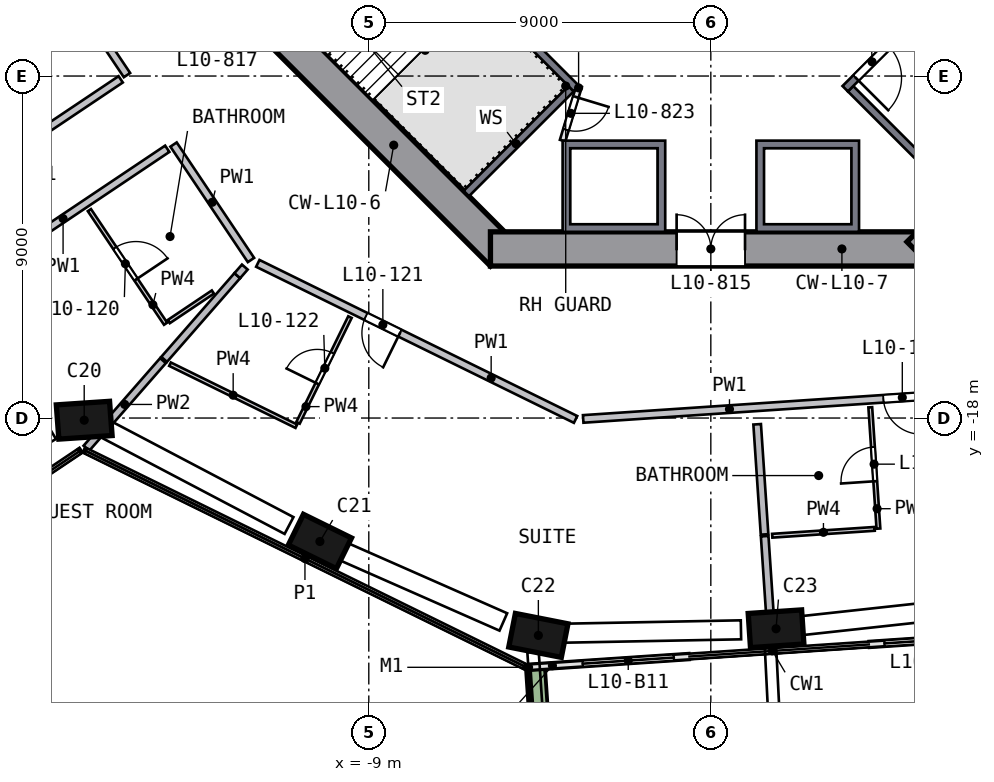
"""IFC4 building model, lengths in metres.
Left out: names, types, materials, properties, quantities, classifications, styles, units other than length and angle.
Written with IfcOpenShell. Run it as: python <this file> out.ifc"""

import sys

from ifc_helpers import new_model, si_unit, direction, frame, frame_2d, origin, origin_2d, place, context, subcontext, project, spatial, polyline, rectangle, outline, extrude, element, fill, save


model = new_model("IFC4")
c1 = context("Model", 3, precision=1e-05, world=origin(), true_north=direction((0.0, 1.0)))
c2 = subcontext(c1, "Body", "Model", "MODEL_VIEW")
j1 = project(units=[si_unit("LENGTHUNIT", "METRE"), si_unit("PLANEANGLEUNIT", "RADIAN")], contexts=[c1])
p1 = place(None, origin())
s1 = spatial("IfcSite", under=j1, at=p1, CompositionType="ELEMENT")
p2 = place(p1, origin())
s2 = spatial("IfcBuilding", under=s1, at=p2, CompositionType="ELEMENT")
p3 = place(p2, frame((0.0, 0.0, 49.5)))
s3 = spatial("IfcBuildingStorey", under=s2, at=p3, CompositionType="ELEMENT", Elevation=49.5)
p4 = place(p3, frame((-16.593, -17.963, 0.0), z_axis=(0.086049291, -0.078219718, 0.993215583), x_axis=(-0.994079328, -0.073128396, 0.080364969)))
e1 = element("IfcColumn", 1, at=p4, inside=s3, PredefinedType="COLUMN", context=c2, shape_type="SweptSolid", body=[
    extrude(rectangle(XDim=1.4, YDim=0.9, at=origin_2d()), origin(), (0.0, 0.0, 1.0), 3.212),
])
p5 = place(p3, frame((-10.408, -21.19, 0.0), z_axis=(0.101222872, -0.048672155, 0.993672457), x_axis=(0.891838808, -0.438188759, -0.11231274)))
e2 = element("IfcColumn", 2, at=p5, inside=s3, PredefinedType="COLUMN", context=c2, shape_type="SweptSolid", body=[
    extrude(rectangle(XDim=1.4, YDim=0.9, at=origin_2d()), origin(), (0.0, 0.0, 1.0), 3.21),
])
p6 = place(p3, frame((-4.675, -23.695, 0.0), z_axis=(0.11290116, -0.021287761, 0.993378155), x_axis=(-0.974579908, 0.192341107, 0.114886474)))
e3 = element("IfcColumn", 3, at=p6, inside=s3, PredefinedType="COLUMN", context=c2, shape_type="SweptSolid", body=[
    extrude(rectangle(XDim=1.4, YDim=0.9, at=origin_2d()), origin(), (0.0, 0.0, 1.0), 3.211),
])
p7 = place(p3, frame((1.581, -23.555, 0.0), z_axis=(0.112021718, 0.008441555, 0.993669902), x_axis=(0.991458896, 0.066257297, -0.112335337)))
e4 = element("IfcColumn", 4, at=p7, inside=s3, PredefinedType="COLUMN", context=c2, shape_type="SweptSolid", body=[
    extrude(rectangle(XDim=1.4, YDim=0.9, at=origin_2d()), origin(), (0.0, 0.0, 1.0), 3.21),
])
p8 = place(p3, frame((-13.682, -5.481, 0.0), z_axis=(0.0, 0.0, 1.0), x_axis=(0.707106781, -0.707106781, 0.0)))
e5 = element("IfcWall", 5, at=p8, inside=s3, PredefinedType="SHEAR", context=c2, shape_type="SweptSolid", body=[
    extrude(rectangle(XDim=11.598, YDim=0.9, at=frame_2d((5.799, 0.0))), origin(), (0.0, 0.0, 1.0), 3.5),
])
p9 = place(p8, frame((2.099, 0.0, 0.0)))
e6 = element("IfcOpeningElement", 6, at=p9, cuts=e5, PredefinedType="OPENING", context=c2, shape_type="SweptSolid", body=[
    extrude(rectangle(XDim=1.2, YDim=2.1, at=frame_2d((0.6, 1.05))), frame((0.0, 0.46, 0.0), z_axis=(0.0, -1.0, 0.0), x_axis=(1.0, 0.0, 0.0)), (0.0, 0.0, 1.0), 0.92),
])
p10 = place(p3, frame((-5.799, -13.55, 0.0), z_axis=(0.0, 0.0, 1.0), x_axis=(1.0, 0.0, 0.0)))
e7 = element("IfcWall", 7, at=p10, inside=s3, PredefinedType="SHEAR", context=c2, shape_type="SweptSolid", body=[
    extrude(rectangle(XDim=11.598, YDim=0.9, at=frame_2d((5.799, 0.0))), origin(), (0.0, 0.0, 1.0), 3.5),
])
p11 = place(p10, frame((4.899, 0.0, 0.0)))
e8 = element("IfcOpeningElement", 8, at=p11, cuts=e7, PredefinedType="OPENING", context=c2, shape_type="SweptSolid", body=[
    extrude(rectangle(XDim=1.8, YDim=2.1, at=frame_2d((0.9, 1.05))), frame((0.0, 0.46, 0.0), z_axis=(0.0, -1.0, 0.0), x_axis=(1.0, 0.0, 0.0)), (0.0, 0.0, 1.0), 0.92),
])
p12 = place(p3, frame((5.481, -13.682, 0.0), z_axis=(0.0, 0.0, 1.0), x_axis=(0.707106781, 0.707106781, 0.0)))
e9 = element("IfcWall", 9, at=p12, inside=s3, PredefinedType="SHEAR", context=c2, shape_type="SweptSolid", body=[
    extrude(rectangle(XDim=11.598, YDim=0.9, at=frame_2d((5.799, 0.0))), origin(), (0.0, 0.0, 1.0), 3.5),
])
p13 = place(p12, frame((2.099, 0.0, 0.0)))
e10 = element("IfcOpeningElement", 10, at=p13, cuts=e9, PredefinedType="OPENING", context=c2, shape_type="SweptSolid", body=[
    extrude(rectangle(XDim=1.2, YDim=2.1, at=frame_2d((0.6, 1.05))), frame((0.0, 0.46, 0.0), z_axis=(0.0, -1.0, 0.0), x_axis=(1.0, 0.0, 0.0)), (0.0, 0.0, 1.0), 0.92),
])
p14 = place(p3, frame((-4.766, -24.558, 0.0), z_axis=(0.0, 0.0, 1.0), x_axis=(0.997753916, 0.066985985, 0.0)))
e11 = element("IfcWall", 11, at=p14, inside=s3, PredefinedType="SOLIDWALL", context=c2, shape_type="SweptSolid", body=[
    extrude(rectangle(XDim=4.199, YDim=0.15, at=frame_2d((2.099, 0.0))), origin(), (0.0, 0.0, 1.0), 2.425),
])
p15 = place(p14, frame((1.399, 0.0, 0.0)))
e12 = element("IfcOpeningElement", 12, at=p15, cuts=e11, PredefinedType="OPENING", context=c2, shape_type="SweptSolid", body=[
    extrude(rectangle(XDim=2.4, YDim=2.4, at=frame_2d((1.2, 1.2))), frame((0.0, 0.085, 0.0), z_axis=(0.0, -1.0, 0.0), x_axis=(1.0, 0.0, 0.0)), (0.0, 0.0, 1.0), 0.17),
])
p16 = place(p3, frame((4.172, -23.958, 0.0), z_axis=(0.0, 0.0, 1.0), x_axis=(0.997754118, 0.066982983, 0.0)))
e13 = element("IfcWall", 13, at=p16, inside=s3, PredefinedType="SOLIDWALL", context=c2, shape_type="SweptSolid", body=[
    extrude(rectangle(XDim=3.842, YDim=0.15, at=frame_2d((1.921, 0.0))), origin(), (0.0, 0.0, 1.0), 2.425),
])
p17 = place(p16, frame((0.4, 0.0, 0.0)))
e14 = element("IfcOpeningElement", 14, at=p17, cuts=e13, PredefinedType="OPENING", context=c2, shape_type="SweptSolid", body=[
    extrude(rectangle(XDim=2.4, YDim=2.4, at=frame_2d((1.2, 1.2))), frame((0.0, 0.085, 0.0), z_axis=(0.0, -1.0, 0.0), x_axis=(1.0, 0.0, 0.0)), (0.0, 0.0, 1.0), 0.17),
])
p18 = place(p3, frame((-4.611, -24.624, 0.0), z_axis=(0.0, 0.0, 1.0), x_axis=(0.067010365, -0.997752279, 0.0)))
e15 = element("IfcWall", 15, at=p18, inside=s3, PredefinedType="SOLIDWALL", context=c2, shape_type="SweptSolid", body=[
    extrude(rectangle(XDim=3.199, YDim=0.5, at=frame_2d((1.599, 0.0))), origin(), (0.0, 0.0, 1.0), 0.7),
])
p19 = place(p3, origin())
e16 = element("IfcWall", 16, at=p19, inside=s3, PredefinedType="SOLIDWALL", context=c2, shape_type="SweptSolid", body=[
    extrude(outline(polyline([(-1.2, -13.1), (-3.9, -13.1), (-3.9, -10.7), (-1.2, -10.7), (-1.2, -13.1)]), holes=[polyline([(-3.7, -10.9), (-3.7, -12.9), (-1.4, -12.9), (-1.4, -10.9), (-3.7, -10.9)])]), origin(), (0.0, 0.0, 1.0), 3.19),
])
p20 = place(p3, origin())
e17 = element("IfcWall", 17, at=p20, inside=s3, PredefinedType="SOLIDWALL", context=c2, shape_type="SweptSolid", body=[
    extrude(outline(polyline([(3.9, -10.7), (3.9, -13.1), (1.2, -13.1), (1.2, -10.7), (3.9, -10.7)]), holes=[polyline([(1.4, -12.9), (3.7, -12.9), (3.7, -10.9), (1.4, -10.9), (1.4, -12.9)])]), origin(), (0.0, 0.0, 1.0), 3.19),
])
p21 = place(p3, frame((-3.535, -9.334, 0.0), z_axis=(0.0, 0.0, 1.0), x_axis=(-0.707106781, 0.707106781, 0.0)))
e18 = element("IfcWall", 18, at=p21, inside=s3, PredefinedType="SOLIDWALL", context=c2, shape_type="SweptSolid", body=[
    extrude(rectangle(XDim=8.2, YDim=0.2, at=frame_2d((4.1, 0.0))), origin(), (0.0, 0.0, 1.0), 3.19),
])
p22 = place(p21, frame((6.6, 0.0, 0.0)))
e19 = element("IfcOpeningElement", 19, at=p22, cuts=e18, PredefinedType="OPENING", context=c2, shape_type="SweptSolid", body=[
    extrude(rectangle(XDim=1.2, YDim=2.1, at=frame_2d((0.6, 1.05))), frame((0.0, 0.11, 0.0), z_axis=(0.0, -1.0, 0.0), x_axis=(1.0, 0.0, 0.0)), (0.0, 0.0, 1.0), 0.22),
])
p23 = place(p3, frame((-3.677, -9.334, 0.0), z_axis=(0.0, 0.0, 1.0), x_axis=(-0.707106781, -0.707106781, 0.0)))
e20 = element("IfcWall", 20, at=p23, inside=s3, PredefinedType="SOLIDWALL", context=c2, shape_type="SweptSolid", body=[
    extrude(rectangle(XDim=3.9, YDim=0.2, at=frame_2d((1.95, 0.0))), origin(), (0.0, 0.0, 1.0), 3.19),
])
p24 = place(p3, frame((9.334, -3.535, 0.0), z_axis=(0.0, 0.0, 1.0), x_axis=(-0.707106781, -0.707106781, 0.0)))
e21 = element("IfcWall", 21, at=p24, inside=s3, PredefinedType="SOLIDWALL", context=c2, shape_type="SweptSolid", body=[
    extrude(rectangle(XDim=8.2, YDim=0.2, at=frame_2d((4.1, 0.0))), origin(), (0.0, 0.0, 1.0), 3.19),
])
p25 = place(p24, frame((6.6, 0.0, 0.0)))
e22 = element("IfcOpeningElement", 22, at=p25, cuts=e21, PredefinedType="OPENING", context=c2, shape_type="SweptSolid", body=[
    extrude(rectangle(XDim=1.2, YDim=2.1, at=frame_2d((0.6, 1.05))), frame((0.0, 0.11, 0.0), z_axis=(0.0, -1.0, 0.0), x_axis=(1.0, 0.0, 0.0)), (0.0, 0.0, 1.0), 0.22),
])
p26 = place(p3, frame((3.677, -9.334, 0.0), z_axis=(0.0, 0.0, 1.0), x_axis=(0.707106781, -0.707106781, 0.0)))
e23 = element("IfcWall", 23, at=p26, inside=s3, PredefinedType="SOLIDWALL", context=c2, shape_type="SweptSolid", body=[
    extrude(rectangle(XDim=3.9, YDim=0.2, at=frame_2d((1.95, 0.0))), origin(), (0.0, 0.0, 1.0), 3.19),
])
p27 = place(p3, frame((-3.465, -9.263, 0.0), z_axis=(0.0, 0.0, 1.0), x_axis=(-0.289808785, -0.957084567, 0.0)))
e24 = element("IfcWall", 24, at=p27, inside=s3, PredefinedType="PARTITIONING", context=c2, shape_type="SweptSolid", body=[
    extrude(rectangle(XDim=1.501, YDim=0.15, at=frame_2d((0.75, 0.0))), origin(), (0.0, 0.0, 1.0), 3.19),
])
p28 = place(p27, frame((0.301, 0.0, 0.0)))
e25 = element("IfcOpeningElement", 25, at=p28, cuts=e24, PredefinedType="OPENING", context=c2, shape_type="SweptSolid", body=[
    extrude(rectangle(XDim=0.9, YDim=2.1, at=frame_2d((0.45, 1.05))), frame((0.0, 0.085, 0.0), z_axis=(0.0, -1.0, 0.0), x_axis=(1.0, 0.0, 0.0)), (0.0, 0.0, 1.0), 0.17),
])
p29 = place(p3, frame((-27.298, -16.978, 0.0), z_axis=(0.0, 0.0, 1.0), x_axis=(0.83059481, 0.556877241, 0.0)))
e26 = element("IfcWall", 26, at=p29, inside=s3, PredefinedType="SOLIDWALL", context=c2, shape_type="SweptSolid", body=[
    extrude(rectangle(XDim=14.169, YDim=0.2, at=frame_2d((7.085, 0.0))), origin(), (0.0, 0.0, 1.0), 3.19),
])
p30 = place(p29, frame((6.3, 0.0, 0.0)))
e27 = element("IfcOpeningElement", 27, at=p30, cuts=e26, PredefinedType="OPENING", context=c2, shape_type="SweptSolid", body=[
    extrude(rectangle(XDim=1.0, YDim=2.1, at=frame_2d((0.5, 1.05))), frame((0.0, 0.11, 0.0), z_axis=(0.0, -1.0, 0.0), x_axis=(1.0, 0.0, 0.0)), (0.0, 0.0, 1.0), 0.22),
])
p31 = place(p3, frame((-14.304, -10.914, 0.0), z_axis=(0.0, 0.0, 1.0), x_axis=(-0.83059481, -0.556877241, 0.0)))
e28 = element("IfcWall", 28, at=p31, inside=s3, PredefinedType="SOLIDWALL", context=c2, shape_type="SweptSolid", body=[
    extrude(rectangle(XDim=14.169, YDim=0.2, at=frame_2d((7.085, 0.0))), origin(), (0.0, 0.0, 1.0), 3.19),
])
p32 = place(p31, frame((12.475, 0.0, 0.0)))
e29 = element("IfcOpeningElement", 29, at=p32, cuts=e28, PredefinedType="OPENING", context=c2, shape_type="SweptSolid", body=[
    extrude(rectangle(XDim=0.9, YDim=2.1, at=frame_2d((0.45, 1.05))), frame((0.0, 0.11, 0.0), z_axis=(0.0, -1.0, 0.0), x_axis=(1.0, 0.0, 0.0)), (0.0, 0.0, 1.0), 0.22),
])
p33 = place(p31, frame((6.8, 0.0, 0.0)))
e30 = element("IfcOpeningElement", 30, at=p33, cuts=e28, PredefinedType="OPENING", context=c2, shape_type="SweptSolid", body=[
    extrude(rectangle(XDim=1.0, YDim=2.1, at=frame_2d((0.5, 1.05))), frame((0.0, 0.11, 0.0), z_axis=(0.0, -1.0, 0.0), x_axis=(1.0, 0.0, 0.0)), (0.0, 0.0, 1.0), 0.22),
])
p34 = place(p3, frame((-17.256, -6.152, 0.0), z_axis=(0.0, 0.0, 1.0), x_axis=(0.556869112, -0.83060026, 0.0)))
e31 = element("IfcWall", 31, at=p34, inside=s3, PredefinedType="SOLIDWALL", context=c2, shape_type="SweptSolid", body=[
    extrude(rectangle(XDim=3.4, YDim=0.2, at=frame_2d((1.7, 0.0))), origin(), (0.0, 0.0, 1.0), 3.19),
])
p35 = place(p3, frame((-14.137, -10.803, 0.0), z_axis=(0.0, 0.0, 1.0), x_axis=(0.556900496, -0.830579218, 0.0)))
e32 = element("IfcWall", 32, at=p35, inside=s3, PredefinedType="SOLIDWALL", context=c2, shape_type="SweptSolid", body=[
    extrude(rectangle(XDim=3.658, YDim=0.2, at=frame_2d((1.829, 0.0))), origin(), (0.0, 0.0, 1.0), 3.19),
])
p36 = place(p3, frame((-3.559, -18.037, 0.0), z_axis=(0.0, 0.0, 1.0), x_axis=(-0.897570519, 0.440870915, 0.0)))
e33 = element("IfcWall", 33, at=p36, inside=s3, PredefinedType="SOLIDWALL", context=c2, shape_type="SweptSolid", body=[
    extrude(rectangle(XDim=9.316, YDim=0.2, at=frame_2d((4.658, 0.0))), origin(), (0.0, 0.0, 1.0), 3.19),
])
p37 = place(p36, frame((5.15, 0.0, 0.0)))
e34 = element("IfcOpeningElement", 34, at=p37, cuts=e33, PredefinedType="OPENING", context=c2, shape_type="SweptSolid", body=[
    extrude(rectangle(XDim=1.0, YDim=2.1, at=frame_2d((0.5, 1.05))), frame((0.0, 0.11, 0.0), z_axis=(0.0, -1.0, 0.0), x_axis=(1.0, 0.0, 0.0)), (0.0, 0.0, 1.0), 0.22),
])
p38 = place(p3, frame((5.737, -17.413, 0.0), z_axis=(0.0, 0.0, 1.0), x_axis=(-0.99775412, -0.066982956, 0.0)))
e35 = element("IfcWall", 35, at=p38, inside=s3, PredefinedType="SOLIDWALL", context=c2, shape_type="SweptSolid", body=[
    extrude(rectangle(XDim=9.116, YDim=0.2, at=frame_2d((4.558, 0.0))), origin(), (0.0, 0.0, 1.0), 3.19),
])
p39 = place(p38, frame((0.2, 0.0, 0.0)))
e36 = element("IfcOpeningElement", 36, at=p39, cuts=e35, PredefinedType="OPENING", context=c2, shape_type="SweptSolid", body=[
    extrude(rectangle(XDim=1.0, YDim=2.1, at=frame_2d((0.5, 1.05))), frame((0.0, 0.11, 0.0), z_axis=(0.0, -1.0, 0.0), x_axis=(1.0, 0.0, 0.0)), (0.0, 0.0, 1.0), 0.22),
])
p40 = place(p3, frame((-14.416, -16.49, 0.0), z_axis=(0.0, 0.0, 1.0), x_axis=(-0.65814885, -0.752887834, 0.0)))
e37 = element("IfcWall", 37, at=p40, inside=s3, PredefinedType="SOLIDWALL", context=c2, shape_type="SweptSolid", body=[
    extrude(rectangle(XDim=3.062, YDim=0.2, at=frame_2d((1.531, 0.0))), origin(), (0.0, 0.0, 1.0), 3.19),
])
p41 = place(p3, frame((-12.46, -14.253, 0.0), z_axis=(0.0, 0.0, 1.0), x_axis=(-0.658144024, -0.752892053, 0.0)))
e38 = element("IfcWall", 38, at=p41, inside=s3, PredefinedType="SOLIDWALL", context=c2, shape_type="SweptSolid", body=[
    extrude(rectangle(XDim=2.925, YDim=0.2, at=frame_2d((1.462, 0.0))), origin(), (0.0, 0.0, 1.0), 3.19),
])
p42 = place(p3, frame((-12.262, -14.027, 0.0), z_axis=(0.0, 0.0, 1.0), x_axis=(-0.658504608, -0.752576695, 0.0)))
e39 = element("IfcWall", 39, at=p42, inside=s3, PredefinedType="SOLIDWALL", context=c2, shape_type="SweptSolid", body=[
    extrude(rectangle(XDim=0.301, YDim=0.2, at=frame_2d((0.15, 0.0))), origin(), (0.0, 0.0, 1.0), 3.19),
])
p43 = place(p3, frame((1.219, -18.165, 0.0), z_axis=(0.0, 0.0, 1.0), x_axis=(0.066987599, -0.997753808, 0.0)))
e40 = element("IfcWall", 40, at=p43, inside=s3, PredefinedType="SOLIDWALL", context=c2, shape_type="SweptSolid", body=[
    extrude(rectangle(XDim=2.905, YDim=0.2, at=frame_2d((1.452, 0.0))), origin(), (0.0, 0.0, 1.0), 3.19),
])
p44 = place(p3, frame((1.417, -21.109, 0.0), z_axis=(0.0, 0.0, 1.0), x_axis=(0.066991081, -0.997753574, 0.0)))
e41 = element("IfcWall", 41, at=p44, inside=s3, PredefinedType="SOLIDWALL", context=c2, shape_type="SweptSolid", body=[
    extrude(rectangle(XDim=2.952, YDim=0.2, at=frame_2d((1.476, 0.0))), origin(), (0.0, 0.0, 1.0), 3.19),
])
p45 = place(p3, frame((-16.352, -12.528, 0.0), z_axis=(0.0, 0.0, 1.0), x_axis=(0.556920558, -0.830565766, 0.0)))
e42 = element("IfcWall", 42, at=p45, inside=s3, PredefinedType="PARTITIONING", context=c2, shape_type="SweptSolid", body=[
    extrude(rectangle(XDim=3.6, YDim=0.1, at=frame_2d((1.8, 0.0))), origin(), (0.0, 0.0, 1.0), 3.19),
])
p46 = place(p45, frame((1.2, 0.0, 0.0)))
e43 = element("IfcOpeningElement", 43, at=p46, cuts=e42, PredefinedType="OPENING", context=c2, shape_type="SweptSolid", body=[
    extrude(rectangle(XDim=1.0, YDim=2.1, at=frame_2d((0.5, 1.05))), frame((0.0, 0.06, 0.0), z_axis=(0.0, -1.0, 0.0), x_axis=(1.0, 0.0, 0.0)), (0.0, 0.0, 1.0), 0.12),
])
p47 = place(p3, frame((-13.102, -14.684, 0.0), z_axis=(0.0, 0.0, 1.0), x_axis=(-0.830597189, -0.556873693, 0.0)))
e44 = element("IfcWall", 44, at=p47, inside=s3, PredefinedType="PARTITIONING", context=c2, shape_type="SweptSolid", body=[
    extrude(rectangle(XDim=1.398, YDim=0.1, at=frame_2d((0.699, 0.0))), origin(), (0.0, 0.0, 1.0), 3.19),
])
p48 = place(p3, frame((-10.906, -18.216, 0.0), z_axis=(0.0, 0.0, 1.0), x_axis=(-0.897555699, 0.440901085, 0.0)))
e45 = element("IfcWall", 45, at=p48, inside=s3, PredefinedType="PARTITIONING", context=c2, shape_type="SweptSolid", body=[
    extrude(rectangle(XDim=3.704, YDim=0.1, at=frame_2d((1.852, 0.0))), origin(), (0.0, 0.0, 1.0), 3.19),
])
p49 = place(p3, frame((-10.862, -18.126, 0.0), z_axis=(0.0, 0.0, 1.0), x_axis=(0.440870487, 0.897570729, 0.0)))
e46 = element("IfcWall", 46, at=p49, inside=s3, PredefinedType="PARTITIONING", context=c2, shape_type="SweptSolid", body=[
    extrude(rectangle(XDim=3.1, YDim=0.1, at=frame_2d((1.55, 0.0))), origin(), (0.0, 0.0, 1.0), 3.19),
])
p50 = place(p49, frame((1.15, 0.0, 0.0)))
e47 = element("IfcOpeningElement", 47, at=p50, cuts=e46, PredefinedType="OPENING", context=c2, shape_type="SweptSolid", body=[
    extrude(rectangle(XDim=0.9, YDim=2.1, at=frame_2d((0.45, 1.05))), frame((0.0, 0.06, 0.0), z_axis=(0.0, -1.0, 0.0), x_axis=(1.0, 0.0, 0.0)), (0.0, 0.0, 1.0), 0.12),
])
p51 = place(p3, frame((4.311, -20.917, 0.0), z_axis=(0.0, 0.0, 1.0), x_axis=(-0.997753036, -0.066999094, 0.0)))
e48 = element("IfcWall", 48, at=p51, inside=s3, PredefinedType="PARTITIONING", context=c2, shape_type="SweptSolid", body=[
    extrude(rectangle(XDim=2.7, YDim=0.1, at=frame_2d((1.35, 0.0))), origin(), (0.0, 0.0, 1.0), 3.19),
])
p52 = place(p3, frame((4.41, -20.91, 0.0), z_axis=(0.0, 0.0, 1.0), x_axis=(-0.06698486, 0.997753992, 0.0)))
e49 = element("IfcWall", 49, at=p52, inside=s3, PredefinedType="PARTITIONING", context=c2, shape_type="SweptSolid", body=[
    extrude(rectangle(XDim=3.2, YDim=0.1, at=frame_2d((1.6, 0.0))), origin(), (0.0, 0.0, 1.0), 3.19),
])
p53 = place(p52, frame((1.25, 0.0, 0.0)))
e50 = element("IfcOpeningElement", 50, at=p53, cuts=e49, PredefinedType="OPENING", context=c2, shape_type="SweptSolid", body=[
    extrude(rectangle(XDim=0.9, YDim=2.1, at=frame_2d((0.45, 1.05))), frame((0.0, 0.06, 0.0), z_axis=(0.0, -1.0, 0.0), x_axis=(1.0, 0.0, 0.0)), (0.0, 0.0, 1.0), 0.12),
])
p54 = place(p15, origin())
e51 = element("IfcDoor", 51, at=p54, inside=s3, OperationType="SLIDING_TO_LEFT", PredefinedType="DOOR", context=c2, shape_type="SweptSolid", body=[
    extrude(rectangle(XDim=2.4, YDim=2.4, at=frame_2d((1.2, 1.2))), frame((0.0, 0.025, 0.0), z_axis=(0.0, -1.0, 0.0), x_axis=(1.0, 0.0, 0.0)), (0.0, 0.0, 1.0), 0.05),
])
fill(e12, e51)
p55 = place(p17, origin())
e52 = element("IfcDoor", 52, at=p55, inside=s3, OperationType="SLIDING_TO_RIGHT", PredefinedType="DOOR", context=c2, shape_type="SweptSolid", body=[
    extrude(rectangle(XDim=2.4, YDim=2.4, at=frame_2d((1.2, 1.2))), frame((0.0, 0.025, 0.0), z_axis=(0.0, -1.0, 0.0), x_axis=(1.0, 0.0, 0.0)), (0.0, 0.0, 1.0), 0.05),
])
fill(e14, e52)
p56 = place(p25, origin())
e53 = element("IfcDoor", 53, at=p56, inside=s3, OperationType="SINGLE_SWING_RIGHT", PredefinedType="DOOR", context=c2, shape_type="SweptSolid", body=[
    extrude(rectangle(XDim=1.2, YDim=2.1, at=frame_2d((0.6, 1.05))), frame((0.0, 0.025, 0.0), z_axis=(0.0, -1.0, 0.0), x_axis=(1.0, 0.0, 0.0)), (0.0, 0.0, 1.0), 0.05),
])
fill(e22, e53)
p57 = place(p11, origin())
e54 = element("IfcDoor", 54, at=p57, inside=s3, OperationType="DOUBLE_DOOR_SINGLE_SWING", PredefinedType="DOOR", context=c2, shape_type="SweptSolid", body=[
    extrude(rectangle(XDim=1.8, YDim=2.1, at=frame_2d((0.9, 1.05))), frame((0.0, 0.025, 0.0), z_axis=(0.0, -1.0, 0.0), x_axis=(1.0, 0.0, 0.0)), (0.0, 0.0, 1.0), 0.05),
])
fill(e8, e54)
p58 = place(p28, origin())
e55 = element("IfcDoor", 55, at=p58, inside=s3, OperationType="SINGLE_SWING_LEFT", PredefinedType="DOOR", context=c2, shape_type="SweptSolid", body=[
    extrude(rectangle(XDim=0.9, YDim=2.1, at=frame_2d((0.45, 1.05))), frame((0.0, 0.025, 0.0), z_axis=(0.0, -1.0, 0.0), x_axis=(1.0, 0.0, 0.0)), (0.0, 0.0, 1.0), 0.05),
])
fill(e25, e55)
p59 = place(p46, origin())
e56 = element("IfcDoor", 56, at=p59, inside=s3, OperationType="SINGLE_SWING_RIGHT", PredefinedType="DOOR", context=c2, shape_type="SweptSolid", body=[
    extrude(rectangle(XDim=1.0, YDim=2.1, at=frame_2d((0.5, 1.05))), frame((0.0, 0.025, 0.0), z_axis=(0.0, -1.0, 0.0), x_axis=(1.0, 0.0, 0.0)), (0.0, 0.0, 1.0), 0.05),
])
fill(e43, e56)
p60 = place(p37, origin())
e57 = element("IfcDoor", 57, at=p60, inside=s3, OperationType="SINGLE_SWING_LEFT", PredefinedType="DOOR", context=c2, shape_type="SweptSolid", body=[
    extrude(rectangle(XDim=1.0, YDim=2.1, at=frame_2d((0.5, 1.05))), frame((0.0, 0.025, 0.0), z_axis=(0.0, -1.0, 0.0), x_axis=(1.0, 0.0, 0.0)), (0.0, 0.0, 1.0), 0.05),
])
fill(e34, e57)
p61 = place(p50, origin())
e58 = element("IfcDoor", 58, at=p61, inside=s3, OperationType="SINGLE_SWING_LEFT", PredefinedType="DOOR", context=c2, shape_type="SweptSolid", body=[
    extrude(rectangle(XDim=0.9, YDim=2.1, at=frame_2d((0.45, 1.05))), frame((0.0, 0.025, 0.0), z_axis=(0.0, -1.0, 0.0), x_axis=(1.0, 0.0, 0.0)), (0.0, 0.0, 1.0), 0.05),
])
fill(e47, e58)
p62 = place(p39, origin())
e59 = element("IfcDoor", 59, at=p62, inside=s3, OperationType="SINGLE_SWING_LEFT", PredefinedType="DOOR", context=c2, shape_type="SweptSolid", body=[
    extrude(rectangle(XDim=1.0, YDim=2.1, at=frame_2d((0.5, 1.05))), frame((0.0, 0.025, 0.0), z_axis=(0.0, -1.0, 0.0), x_axis=(1.0, 0.0, 0.0)), (0.0, 0.0, 1.0), 0.05),
])
fill(e36, e59)
p63 = place(p53, origin())
e60 = element("IfcDoor", 60, at=p63, inside=s3, OperationType="SINGLE_SWING_LEFT", PredefinedType="DOOR", context=c2, shape_type="SweptSolid", body=[
    extrude(rectangle(XDim=0.9, YDim=2.1, at=frame_2d((0.45, 1.05))), frame((0.0, 0.025, 0.0), z_axis=(0.0, -1.0, 0.0), x_axis=(1.0, 0.0, 0.0)), (0.0, 0.0, 1.0), 0.05),
])
fill(e50, e60)
save(model, sys.argv[1])
